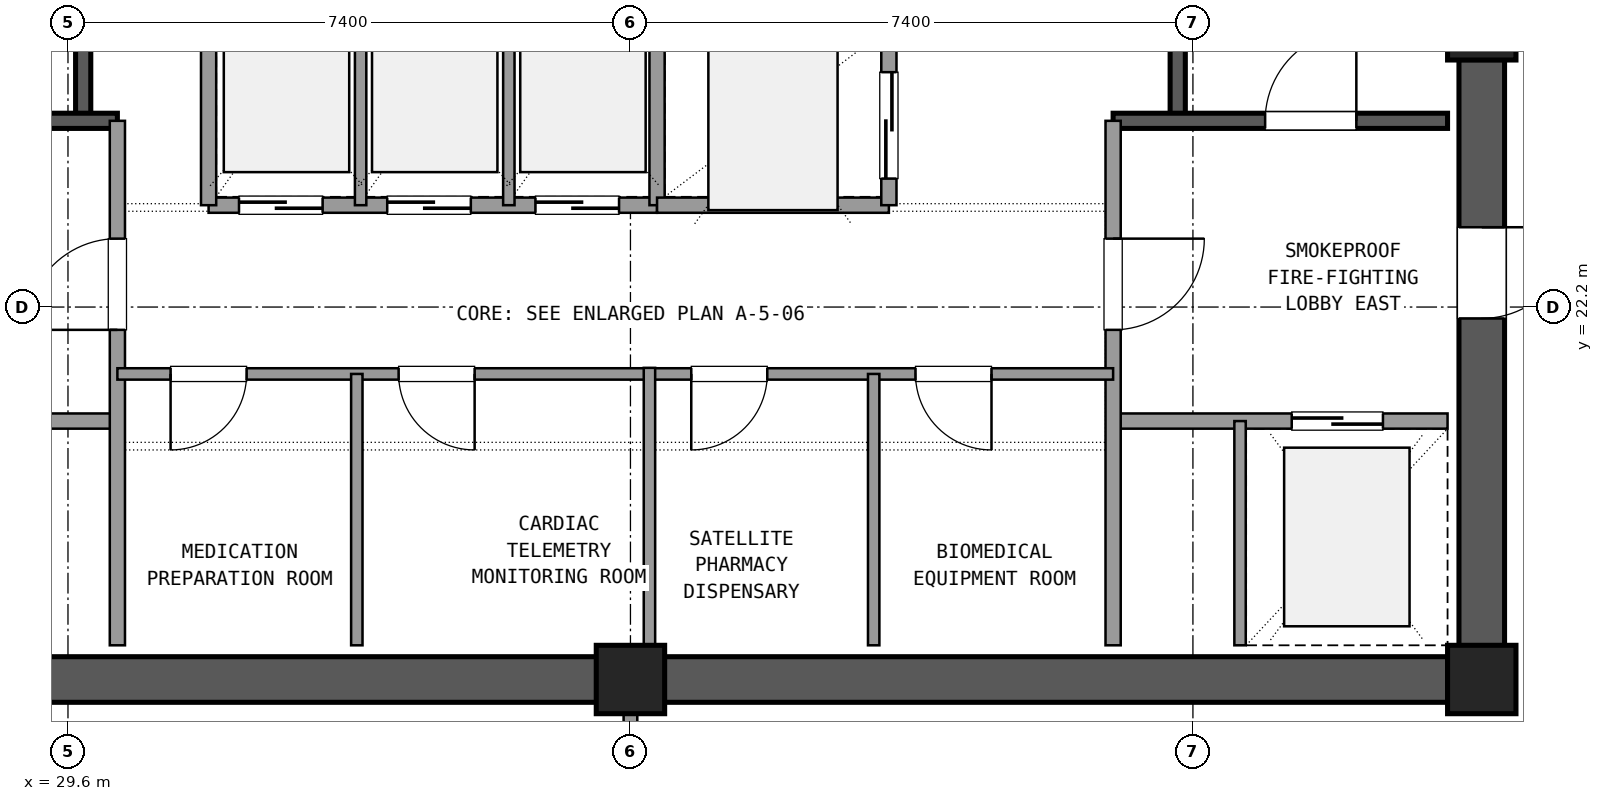
"""IFC4 building model, lengths in metres.
Left out: names, types, materials, properties, quantities, classifications, styles, units other than length and angle.
Written with IfcOpenShell. Run it as: python <this file> out.ifc"""

import sys

from ifc_helpers import new_model, si_unit, direction, frame, frame_2d, origin, origin_2d, place, context, subcontext, project, spatial, rectangle, extrude, element, fill, save


model = new_model("IFC4")
c1 = context("Model", 3, precision=1e-05, world=origin(), true_north=direction((0.0, 1.0)))
c2 = subcontext(c1, "Body", "Model", "MODEL_VIEW")
j1 = project(units=[si_unit("LENGTHUNIT", "METRE"), si_unit("PLANEANGLEUNIT", "RADIAN")], contexts=[c1])
p1 = place(None, origin())
s1 = spatial("IfcSite", under=j1, at=p1, CompositionType="ELEMENT")
p2 = place(p1, origin())
s2 = spatial("IfcBuilding", under=s1, at=p2, CompositionType="ELEMENT")
p3 = place(p2, frame((0.0, 0.0, 237.06)))
s3 = spatial("IfcBuildingStorey", under=s2, at=p3, CompositionType="ELEMENT", Elevation=237.06)
for number, where, z_axis, x_axis in (
    (1, (37.0, 17.3, 0.0), (0.0, 0.0, 1.0), (1.0, 0.0, 0.0)),
    (2, (48.2, 17.3, 0.0), (0.0, 0.0, 1.0), (1.0, 0.0, 0.0)),
    (3, (48.2, 25.9, 0.0), (0.0, 0.0, 1.0), (1.0, 0.0, 0.0)),
):
    element("IfcColumn", number, at=place(p3, frame(where, z_axis=z_axis, x_axis=x_axis)), inside=s3, PredefinedType="COLUMN", context=c2, shape_type="SweptSolid", body=[
        extrude(rectangle(XDim=0.9, YDim=0.9, at=origin_2d()), origin(), (0.0, 0.0, 1.0), 5.76),
    ])
for number, where, z_axis, x_axis in (
    (4, (26.245, 17.3, 0.0), (0.0, 0.0, 1.0), (1.0, 0.0, 0.0)),
    (5, (37.445, 17.3, 0.0), (0.0, 0.0, 1.0), (1.0, 0.0, 0.0)),
):
    element("IfcWall", number, at=place(p3, frame(where, z_axis=z_axis, x_axis=x_axis)), inside=s3, PredefinedType="SHEAR", context=c2, shape_type="SweptSolid", body=[
        extrude(rectangle(XDim=10.31, YDim=0.6, at=frame_2d((5.155, 0.0))), origin(), (0.0, 0.0, 1.0), 5.48),
    ])
p4 = place(p3, frame((48.2, 17.745, 0.0), z_axis=(0.0, 0.0, 1.0), x_axis=(0.0, 1.0, 0.0)))
e6 = element("IfcWall", 6, at=p4, inside=s3, PredefinedType="SHEAR", context=c2, shape_type="SweptSolid", body=[
    extrude(rectangle(XDim=7.71, YDim=0.6, at=frame_2d((3.855, 0.0))), origin(), (0.0, 0.0, 1.0), 5.48),
])
p5 = place(p4, frame((4.305, 0.0, 0.0)))
e7 = element("IfcOpeningElement", 7, at=p5, cuts=e6, PredefinedType="OPENING", context=c2, shape_type="SweptSolid", body=[
    extrude(rectangle(XDim=1.2, YDim=2.15, at=frame_2d((0.6, 1.075))), frame((0.0, 0.31, 0.0), z_axis=(0.0, -1.0, 0.0), x_axis=(1.0, 0.0, 0.0)), (0.0, 0.0, 1.0), 0.62),
])
p6 = place(p3, frame((29.8, 24.65, 0.0), z_axis=(0.0, 0.0, 1.0), x_axis=(0.0, 1.0, 0.0)))
e8 = element("IfcWall", 8, at=p6, inside=s3, PredefinedType="SHEAR", context=c2, shape_type="SweptSolid", body=[
    extrude(rectangle(XDim=9.4, YDim=0.2, at=frame_2d((4.7, 0.0))), origin(), (0.0, 0.0, 1.0), 5.48),
])
p7 = place(p3, frame((26.25, 24.65, 0.0), z_axis=(0.0, 0.0, 1.0), x_axis=(1.0, 0.0, 0.0)))
e9 = element("IfcWall", 9, at=p7, inside=s3, PredefinedType="SHEAR", context=c2, shape_type="SweptSolid", body=[
    extrude(rectangle(XDim=4.0, YDim=0.2, at=frame_2d((2.0, 0.0))), origin(), (0.0, 0.0, 1.0), 5.48),
])
p8 = place(p7, frame((1.0, 0.0, 0.0)))
e10 = element("IfcOpeningElement", 10, at=p8, cuts=e9, PredefinedType="OPENING", context=c2, shape_type="SweptSolid", body=[
    extrude(rectangle(XDim=1.2, YDim=2.15, at=frame_2d((0.6, 1.075))), frame((0.0, 0.11, 0.0), z_axis=(0.0, -1.0, 0.0), x_axis=(1.0, 0.0, 0.0)), (0.0, 0.0, 1.0), 0.22),
])
p9 = place(p3, frame((44.2, 24.65, 0.0), z_axis=(0.0, 0.0, 1.0), x_axis=(0.0, 1.0, 0.0)))
e11 = element("IfcWall", 11, at=p9, inside=s3, PredefinedType="SHEAR", context=c2, shape_type="SweptSolid", body=[
    extrude(rectangle(XDim=9.4, YDim=0.2, at=frame_2d((4.7, 0.0))), origin(), (0.0, 0.0, 1.0), 5.48),
])
p10 = place(p3, frame((43.35, 24.65, 0.0), z_axis=(0.0, 0.0, 1.0), x_axis=(1.0, 0.0, 0.0)))
e12 = element("IfcWall", 12, at=p10, inside=s3, PredefinedType="SHEAR", context=c2, shape_type="SweptSolid", body=[
    extrude(rectangle(XDim=4.4, YDim=0.2, at=frame_2d((2.2, 0.0))), origin(), (0.0, 0.0, 1.0), 5.48),
])
p11 = place(p10, frame((2.0, 0.0, 0.0)))
e13 = element("IfcOpeningElement", 13, at=p11, cuts=e12, PredefinedType="OPENING", context=c2, shape_type="SweptSolid", body=[
    extrude(rectangle(XDim=1.2, YDim=2.15, at=frame_2d((0.6, 1.075))), frame((0.0, 0.11, 0.0), z_axis=(0.0, -1.0, 0.0), x_axis=(1.0, 0.0, 0.0)), (0.0, 0.0, 1.0), 0.22),
])
p12 = place(p3, frame((26.25, 20.7, 0.0), z_axis=(0.0, 0.0, 1.0), x_axis=(1.0, 0.0, 0.0)))
e14 = element("IfcWall", 14, at=p12, inside=s3, PredefinedType="SOLIDWALL", context=c2, shape_type="SweptSolid", body=[
    extrude(rectangle(XDim=4.0, YDim=0.2, at=frame_2d((2.0, 0.0))), origin(), (0.0, 0.0, 1.0), 4.77),
])
p13 = place(p12, frame((0.65, 0.0, 0.0)))
e15 = element("IfcOpeningElement", 15, at=p13, cuts=e14, PredefinedType="OPENING", context=c2, shape_type="SweptSolid", body=[
    extrude(rectangle(XDim=1.2, YDim=2.15, at=frame_2d((0.6, 1.075))), frame((0.0, 0.11, 0.0), z_axis=(0.0, -1.0, 0.0), x_axis=(1.0, 0.0, 0.0)), (0.0, 0.0, 1.0), 0.22),
])
p14 = place(p3, frame((30.25, 17.75, 0.0), z_axis=(0.0, 0.0, 1.0), x_axis=(0.0, 1.0, 0.0)))
e16 = element("IfcWall", 16, at=p14, inside=s3, PredefinedType="SOLIDWALL", context=c2, shape_type="SweptSolid", body=[
    extrude(rectangle(XDim=6.9, YDim=0.2, at=frame_2d((3.45, 0.0))), origin(), (0.0, 0.0, 1.0), 4.77),
])
p15 = place(p14, frame((4.15, 0.0, 0.0)))
e17 = element("IfcOpeningElement", 17, at=p15, cuts=e16, PredefinedType="OPENING", context=c2, shape_type="SweptSolid", body=[
    extrude(rectangle(XDim=1.2, YDim=2.15, at=frame_2d((0.6, 1.075))), frame((0.0, 0.11, 0.0), z_axis=(0.0, -1.0, 0.0), x_axis=(1.0, 0.0, 0.0)), (0.0, 0.0, 1.0), 0.22),
])
p16 = place(p3, frame((43.35, 20.7, 0.0), z_axis=(0.0, 0.0, 1.0), x_axis=(1.0, 0.0, 0.0)))
e18 = element("IfcWall", 18, at=p16, inside=s3, PredefinedType="SOLIDWALL", context=c2, shape_type="SweptSolid", body=[
    extrude(rectangle(XDim=4.4, YDim=0.2, at=frame_2d((2.2, 0.0))), origin(), (0.0, 0.0, 1.0), 4.77),
])
p17 = place(p16, frame((2.35, 0.0, 0.0)))
e19 = element("IfcOpeningElement", 19, at=p17, cuts=e18, PredefinedType="OPENING", context=c2, shape_type="SweptSolid", body=[
    extrude(rectangle(XDim=1.2, YDim=2.15, at=frame_2d((0.6, 1.075))), frame((0.0, 0.11, 0.0), z_axis=(0.0, -1.0, 0.0), x_axis=(1.0, 0.0, 0.0)), (0.0, 0.0, 1.0), 0.22),
])
p18 = place(p3, frame((43.35, 17.75, 0.0), z_axis=(0.0, 0.0, 1.0), x_axis=(0.0, 1.0, 0.0)))
e20 = element("IfcWall", 20, at=p18, inside=s3, PredefinedType="SOLIDWALL", context=c2, shape_type="SweptSolid", body=[
    extrude(rectangle(XDim=6.9, YDim=0.2, at=frame_2d((3.45, 0.0))), origin(), (0.0, 0.0, 1.0), 4.77),
])
p19 = place(p18, frame((4.15, 0.0, 0.0)))
e21 = element("IfcOpeningElement", 21, at=p19, cuts=e20, PredefinedType="OPENING", context=c2, shape_type="SweptSolid", body=[
    extrude(rectangle(XDim=1.2, YDim=2.15, at=frame_2d((0.6, 1.075))), frame((0.0, 0.11, 0.0), z_axis=(0.0, -1.0, 0.0), x_axis=(1.0, 0.0, 0.0)), (0.0, 0.0, 1.0), 0.22),
])
p20 = place(p3, frame((45.02, 17.75, 0.0), z_axis=(0.0, 0.0, 1.0), x_axis=(0.0, 1.0, 0.0)))
e22 = element("IfcWall", 22, at=p20, inside=s3, PredefinedType="PARTITIONING", context=c2, shape_type="SweptSolid", body=[
    extrude(rectangle(XDim=2.95, YDim=0.15, at=frame_2d((1.475, 0.0))), origin(), (0.0, 0.0, 1.0), 4.77),
])
p21 = place(p3, frame((30.25, 21.32, 0.0), z_axis=(0.0, 0.0, 1.0), x_axis=(1.0, 0.0, 0.0)))
e23 = element("IfcWall", 23, at=p21, inside=s3, PredefinedType="PARTITIONING", context=c2, shape_type="SweptSolid", body=[
    extrude(rectangle(XDim=7.0, YDim=0.15, at=frame_2d((3.5, 0.0))), origin(), (0.0, 0.0, 1.0), 4.77),
])
p22 = place(p21, frame((0.7, 0.0, 0.0)))
e24 = element("IfcOpeningElement", 24, at=p22, cuts=e23, PredefinedType="OPENING", context=c2, shape_type="SweptSolid", body=[
    extrude(rectangle(XDim=1.0, YDim=2.15, at=frame_2d((0.5, 1.075))), frame((0.0, 0.085, 0.0), z_axis=(0.0, -1.0, 0.0), x_axis=(1.0, 0.0, 0.0)), (0.0, 0.0, 1.0), 0.17),
])
p23 = place(p21, frame((3.7, 0.0, 0.0)))
e25 = element("IfcOpeningElement", 25, at=p23, cuts=e23, PredefinedType="OPENING", context=c2, shape_type="SweptSolid", body=[
    extrude(rectangle(XDim=1.0, YDim=2.15, at=frame_2d((0.5, 1.075))), frame((0.0, 0.085, 0.0), z_axis=(0.0, -1.0, 0.0), x_axis=(1.0, 0.0, 0.0)), (0.0, 0.0, 1.0), 0.17),
])
p24 = place(p3, frame((33.4, 17.75, 0.0), z_axis=(0.0, 0.0, 1.0), x_axis=(0.0, 1.0, 0.0)))
e26 = element("IfcWall", 26, at=p24, inside=s3, PredefinedType="PARTITIONING", context=c2, shape_type="SweptSolid", body=[
    extrude(rectangle(XDim=3.57, YDim=0.15, at=frame_2d((1.785, 0.0))), origin(), (0.0, 0.0, 1.0), 4.77),
])
p25 = place(p3, frame((37.25, 21.32, 0.0), z_axis=(0.0, 0.0, 1.0), x_axis=(1.0, 0.0, 0.0)))
e27 = element("IfcWall", 27, at=p25, inside=s3, PredefinedType="PARTITIONING", context=c2, shape_type="SweptSolid", body=[
    extrude(rectangle(XDim=6.1, YDim=0.15, at=frame_2d((3.05, 0.0))), origin(), (0.0, 0.0, 1.0), 4.77),
])
p26 = place(p25, frame((0.55, 0.0, 0.0)))
e28 = element("IfcOpeningElement", 28, at=p26, cuts=e27, PredefinedType="OPENING", context=c2, shape_type="SweptSolid", body=[
    extrude(rectangle(XDim=1.0, YDim=2.15, at=frame_2d((0.5, 1.075))), frame((0.0, 0.085, 0.0), z_axis=(0.0, -1.0, 0.0), x_axis=(1.0, 0.0, 0.0)), (0.0, 0.0, 1.0), 0.17),
])
p27 = place(p25, frame((3.5, 0.0, 0.0)))
e29 = element("IfcOpeningElement", 29, at=p27, cuts=e27, PredefinedType="OPENING", context=c2, shape_type="SweptSolid", body=[
    extrude(rectangle(XDim=1.0, YDim=2.15, at=frame_2d((0.5, 1.075))), frame((0.0, 0.085, 0.0), z_axis=(0.0, -1.0, 0.0), x_axis=(1.0, 0.0, 0.0)), (0.0, 0.0, 1.0), 0.17),
])
p28 = place(p3, frame((40.2, 17.75, 0.0), z_axis=(0.0, 0.0, 1.0), x_axis=(0.0, 1.0, 0.0)))
e30 = element("IfcWall", 30, at=p28, inside=s3, PredefinedType="PARTITIONING", context=c2, shape_type="SweptSolid", body=[
    extrude(rectangle(XDim=3.57, YDim=0.15, at=frame_2d((1.785, 0.0))), origin(), (0.0, 0.0, 1.0), 4.77),
])
p29 = place(p3, frame((37.25, 17.75, 0.0), z_axis=(0.0, 0.0, 1.0), x_axis=(0.0, 1.0, 0.0)))
e31 = element("IfcWall", 31, at=p29, inside=s3, PredefinedType="PARTITIONING", context=c2, shape_type="SweptSolid", body=[
    extrude(rectangle(XDim=3.65, YDim=0.15, at=frame_2d((1.825, 0.0))), origin(), (0.0, 0.0, 1.0), 4.77),
])
p30 = place(p3, frame((31.45, 23.54, 0.0), z_axis=(0.0, 0.0, 1.0), x_axis=(1.0, 0.0, 0.0)))
e32 = element("IfcWall", 32, at=p30, inside=s3, PredefinedType="SOLIDWALL", context=c2, shape_type="SweptSolid", body=[
    extrude(rectangle(XDim=5.9, YDim=0.2, at=frame_2d((2.95, 0.0))), origin(), (0.0, 0.0, 1.0), 4.77),
])
p31 = place(p30, frame((0.4, 0.0, 0.0)))
e33 = element("IfcOpeningElement", 33, at=p31, cuts=e32, PredefinedType="OPENING", context=c2, shape_type="SweptSolid", body=[
    extrude(rectangle(XDim=1.1, YDim=2.15, at=frame_2d((0.55, 1.075))), frame((0.0, 0.11, 0.0), z_axis=(0.0, -1.0, 0.0), x_axis=(1.0, 0.0, 0.0)), (0.0, 0.0, 1.0), 0.22),
])
p32 = place(p30, frame((2.35, 0.0, 0.0)))
e34 = element("IfcOpeningElement", 34, at=p32, cuts=e32, PredefinedType="OPENING", context=c2, shape_type="SweptSolid", body=[
    extrude(rectangle(XDim=1.1, YDim=2.15, at=frame_2d((0.55, 1.075))), frame((0.0, 0.11, 0.0), z_axis=(0.0, -1.0, 0.0), x_axis=(1.0, 0.0, 0.0)), (0.0, 0.0, 1.0), 0.22),
])
p33 = place(p30, frame((4.3, 0.0, 0.0)))
e35 = element("IfcOpeningElement", 35, at=p33, cuts=e32, PredefinedType="OPENING", context=c2, shape_type="SweptSolid", body=[
    extrude(rectangle(XDim=1.1, YDim=2.15, at=frame_2d((0.55, 1.075))), frame((0.0, 0.11, 0.0), z_axis=(0.0, -1.0, 0.0), x_axis=(1.0, 0.0, 0.0)), (0.0, 0.0, 1.0), 0.22),
])
p34 = place(p3, frame((31.45, 23.54, 0.0), z_axis=(0.0, 0.0, 1.0), x_axis=(0.0, 1.0, 0.0)))
e36 = element("IfcWall", 36, at=p34, inside=s3, PredefinedType="SOLIDWALL", context=c2, shape_type="SweptSolid", body=[
    extrude(rectangle(XDim=2.81, YDim=0.2, at=frame_2d((1.405, 0.0))), origin(), (0.0, 0.0, 1.0), 4.77),
])
for number, where, z_axis, x_axis in (
    (37, (33.45, 23.54, 0.0), (0.0, 0.0, 1.0), (0.0, 1.0, 0.0)),
    (38, (35.4, 23.54, 0.0), (0.0, 0.0, 1.0), (0.0, 1.0, 0.0)),
):
    element("IfcWall", number, at=place(p3, frame(where, z_axis=z_axis, x_axis=x_axis)), inside=s3, PredefinedType="PARTITIONING", context=c2, shape_type="SweptSolid", body=[
        extrude(rectangle(XDim=2.81, YDim=0.15, at=frame_2d((1.405, 0.0))), origin(), (0.0, 0.0, 1.0), 4.77),
    ])
p35 = place(p3, frame((37.35, 23.54, 0.0), z_axis=(0.0, 0.0, 1.0), x_axis=(0.0, 1.0, 0.0)))
e39 = element("IfcWall", 39, at=p35, inside=s3, PredefinedType="SOLIDWALL", context=c2, shape_type="SweptSolid", body=[
    extrude(rectangle(XDim=6.82, YDim=0.2, at=frame_2d((3.41, 0.0))), origin(), (0.0, 0.0, 1.0), 4.77),
])
p36 = place(p3, frame((37.35, 23.54, 0.0), z_axis=(0.0, 0.0, 1.0), x_axis=(1.0, 0.0, 0.0)))
e40 = element("IfcWall", 40, at=p36, inside=s3, PredefinedType="SOLIDWALL", context=c2, shape_type="SweptSolid", body=[
    extrude(rectangle(XDim=3.05, YDim=0.2, at=frame_2d((1.525, 0.0))), origin(), (0.0, 0.0, 1.0), 4.77),
])
p37 = place(p3, frame((40.4, 23.54, 0.0), z_axis=(0.0, 0.0, 1.0), x_axis=(0.0, 1.0, 0.0)))
e41 = element("IfcWall", 41, at=p37, inside=s3, PredefinedType="SOLIDWALL", context=c2, shape_type="SweptSolid", body=[
    extrude(rectangle(XDim=6.82, YDim=0.2, at=frame_2d((3.41, 0.0))), origin(), (0.0, 0.0, 1.0), 4.77),
])
p38 = place(p37, frame((0.35, 0.0, 0.0)))
e42 = element("IfcOpeningElement", 42, at=p38, cuts=e41, PredefinedType="OPENING", context=c2, shape_type="SweptSolid", body=[
    extrude(rectangle(XDim=1.4, YDim=2.2, at=frame_2d((0.7, 1.1))), frame((0.0, 0.11, 0.0), z_axis=(0.0, -1.0, 0.0), x_axis=(1.0, 0.0, 0.0)), (0.0, 0.0, 1.0), 0.22),
])
p39 = place(p37, frame((2.65, 0.0, 0.0)))
e43 = element("IfcOpeningElement", 43, at=p39, cuts=e41, PredefinedType="OPENING", context=c2, shape_type="SweptSolid", body=[
    extrude(rectangle(XDim=1.4, YDim=2.2, at=frame_2d((0.7, 1.1))), frame((0.0, 0.11, 0.0), z_axis=(0.0, -1.0, 0.0), x_axis=(1.0, 0.0, 0.0)), (0.0, 0.0, 1.0), 0.22),
])
p40 = place(p37, frame((4.85, 0.0, 0.0)))
e44 = element("IfcOpeningElement", 44, at=p40, cuts=e41, PredefinedType="OPENING", context=c2, shape_type="SweptSolid", body=[
    extrude(rectangle(XDim=1.4, YDim=2.2, at=frame_2d((0.7, 1.1))), frame((0.0, 0.11, 0.0), z_axis=(0.0, -1.0, 0.0), x_axis=(1.0, 0.0, 0.0)), (0.0, 0.0, 1.0), 0.22),
])
p41 = place(p3, frame((37.0, 14.29, 0.0), z_axis=(0.0, 0.0, 1.0), x_axis=(0.0, 1.0, 0.0)))
e45 = element("IfcWall", 45, at=p41, inside=s3, PredefinedType="PARTITIONING", context=c2, shape_type="SweptSolid", body=[
    extrude(rectangle(XDim=2.56, YDim=0.18, at=frame_2d((1.28, 0.0))), origin(), (0.0, 0.0, 1.0), 4.77),
])
p42 = place(p41, frame((0.28, 0.0, 0.0)))
e46 = element("IfcOpeningElement", 46, at=p42, cuts=e45, PredefinedType="OPENING", context=c2, shape_type="SweptSolid", body=[
    extrude(rectangle(XDim=2.0, YDim=2.2, at=frame_2d((1.0, 1.1))), frame((0.0, 0.1, 0.0), z_axis=(0.0, -1.0, 0.0), x_axis=(1.0, 0.0, 0.0)), (0.0, 0.0, 1.0), 0.2),
])
p43 = place(p11, origin())
e47 = element("IfcDoor", 47, at=p43, inside=s3, OperationType="SINGLE_SWING_RIGHT", PredefinedType="DOOR", context=c2, shape_type="SweptSolid", body=[
    extrude(rectangle(XDim=1.2, YDim=2.15, at=frame_2d((0.6, 1.075))), frame((0.0, 0.025, 0.0), z_axis=(0.0, -1.0, 0.0), x_axis=(1.0, 0.0, 0.0)), (0.0, 0.0, 1.0), 0.05),
])
fill(e13, e47)
p44 = place(p15, origin())
e48 = element("IfcDoor", 48, at=p44, inside=s3, OperationType="SINGLE_SWING_LEFT", PredefinedType="DOOR", context=c2, shape_type="SweptSolid", body=[
    extrude(rectangle(XDim=1.2, YDim=2.15, at=frame_2d((0.6, 1.075))), frame((0.0, 0.025, 0.0), z_axis=(0.0, -1.0, 0.0), x_axis=(1.0, 0.0, 0.0)), (0.0, 0.0, 1.0), 0.05),
])
fill(e17, e48)
p45 = place(p17, origin())
e49 = element("IfcDoor", 49, at=p45, inside=s3, OperationType="SLIDING_TO_RIGHT", PredefinedType="DOOR", context=c2, shape_type="SweptSolid", body=[
    extrude(rectangle(XDim=1.2, YDim=2.15, at=frame_2d((0.6, 1.075))), frame((0.0, 0.025, 0.0), z_axis=(0.0, -1.0, 0.0), x_axis=(1.0, 0.0, 0.0)), (0.0, 0.0, 1.0), 0.05),
])
fill(e19, e49)
p46 = place(p19, frame((1.2, 0.0, 0.0), z_axis=(0.0, 0.0, 1.0), x_axis=(-1.0, 0.0, 0.0)))
e50 = element("IfcDoor", 50, at=p46, inside=s3, OperationType="SINGLE_SWING_RIGHT", PredefinedType="DOOR", context=c2, shape_type="SweptSolid", body=[
    extrude(rectangle(XDim=1.2, YDim=2.15, at=frame_2d((0.6, 1.075))), frame((0.0, 0.025, 0.0), z_axis=(0.0, -1.0, 0.0), x_axis=(1.0, 0.0, 0.0)), (0.0, 0.0, 1.0), 0.05),
])
fill(e21, e50)
p47 = place(p5, frame((1.2, 0.0, 0.0), z_axis=(0.0, 0.0, 1.0), x_axis=(-1.0, 0.0, 0.0)))
e51 = element("IfcDoor", 51, at=p47, inside=s3, OperationType="SINGLE_SWING_RIGHT", PredefinedType="DOOR", context=c2, shape_type="SweptSolid", body=[
    extrude(rectangle(XDim=1.2, YDim=2.15, at=frame_2d((0.6, 1.075))), frame((0.0, 0.025, 0.0), z_axis=(0.0, -1.0, 0.0), x_axis=(1.0, 0.0, 0.0)), (0.0, 0.0, 1.0), 0.05),
])
fill(e7, e51)
p48 = place(p22, frame((1.0, 0.0, 0.0), z_axis=(0.0, 0.0, 1.0), x_axis=(-1.0, 0.0, 0.0)))
e52 = element("IfcDoor", 52, at=p48, inside=s3, OperationType="SINGLE_SWING_LEFT", PredefinedType="DOOR", context=c2, shape_type="SweptSolid", body=[
    extrude(rectangle(XDim=1.0, YDim=2.15, at=frame_2d((0.5, 1.075))), frame((0.0, 0.025, 0.0), z_axis=(0.0, -1.0, 0.0), x_axis=(1.0, 0.0, 0.0)), (0.0, 0.0, 1.0), 0.05),
])
fill(e24, e52)
p49 = place(p23, frame((1.0, 0.0, 0.0), z_axis=(0.0, 0.0, 1.0), x_axis=(-1.0, 0.0, 0.0)))
e53 = element("IfcDoor", 53, at=p49, inside=s3, OperationType="SINGLE_SWING_RIGHT", PredefinedType="DOOR", context=c2, shape_type="SweptSolid", body=[
    extrude(rectangle(XDim=1.0, YDim=2.15, at=frame_2d((0.5, 1.075))), frame((0.0, 0.025, 0.0), z_axis=(0.0, -1.0, 0.0), x_axis=(1.0, 0.0, 0.0)), (0.0, 0.0, 1.0), 0.05),
])
fill(e25, e53)
p50 = place(p26, frame((1.0, 0.0, 0.0), z_axis=(0.0, 0.0, 1.0), x_axis=(-1.0, 0.0, 0.0)))
e54 = element("IfcDoor", 54, at=p50, inside=s3, OperationType="SINGLE_SWING_LEFT", PredefinedType="DOOR", context=c2, shape_type="SweptSolid", body=[
    extrude(rectangle(XDim=1.0, YDim=2.15, at=frame_2d((0.5, 1.075))), frame((0.0, 0.025, 0.0), z_axis=(0.0, -1.0, 0.0), x_axis=(1.0, 0.0, 0.0)), (0.0, 0.0, 1.0), 0.05),
])
fill(e28, e54)
p51 = place(p27, frame((1.0, 0.0, 0.0), z_axis=(0.0, 0.0, 1.0), x_axis=(-1.0, 0.0, 0.0)))
e55 = element("IfcDoor", 55, at=p51, inside=s3, OperationType="SINGLE_SWING_RIGHT", PredefinedType="DOOR", context=c2, shape_type="SweptSolid", body=[
    extrude(rectangle(XDim=1.0, YDim=2.15, at=frame_2d((0.5, 1.075))), frame((0.0, 0.025, 0.0), z_axis=(0.0, -1.0, 0.0), x_axis=(1.0, 0.0, 0.0)), (0.0, 0.0, 1.0), 0.05),
])
fill(e29, e55)
p52 = place(p31, origin())
e56 = element("IfcDoor", 56, at=p52, inside=s3, OperationType="SLIDING_TO_RIGHT", PredefinedType="DOOR", context=c2, shape_type="SweptSolid", body=[
    extrude(rectangle(XDim=1.1, YDim=2.15, at=frame_2d((0.55, 1.075))), frame((0.0, 0.025, 0.0), z_axis=(0.0, -1.0, 0.0), x_axis=(1.0, 0.0, 0.0)), (0.0, 0.0, 1.0), 0.05),
])
fill(e33, e56)
p53 = place(p32, origin())
e57 = element("IfcDoor", 57, at=p53, inside=s3, OperationType="SLIDING_TO_RIGHT", PredefinedType="DOOR", context=c2, shape_type="SweptSolid", body=[
    extrude(rectangle(XDim=1.1, YDim=2.15, at=frame_2d((0.55, 1.075))), frame((0.0, 0.025, 0.0), z_axis=(0.0, -1.0, 0.0), x_axis=(1.0, 0.0, 0.0)), (0.0, 0.0, 1.0), 0.05),
])
fill(e34, e57)
p54 = place(p33, origin())
e58 = element("IfcDoor", 58, at=p54, inside=s3, OperationType="SLIDING_TO_RIGHT", PredefinedType="DOOR", context=c2, shape_type="SweptSolid", body=[
    extrude(rectangle(XDim=1.1, YDim=2.15, at=frame_2d((0.55, 1.075))), frame((0.0, 0.025, 0.0), z_axis=(0.0, -1.0, 0.0), x_axis=(1.0, 0.0, 0.0)), (0.0, 0.0, 1.0), 0.05),
])
fill(e35, e58)
p55 = place(p38, origin())
e59 = element("IfcDoor", 59, at=p55, inside=s3, OperationType="SLIDING_TO_LEFT", PredefinedType="DOOR", context=c2, shape_type="SweptSolid", body=[
    extrude(rectangle(XDim=1.4, YDim=2.2, at=frame_2d((0.7, 1.1))), frame((0.0, 0.025, 0.0), z_axis=(0.0, -1.0, 0.0), x_axis=(1.0, 0.0, 0.0)), (0.0, 0.0, 1.0), 0.05),
])
fill(e42, e59)
save(model, sys.argv[1])
